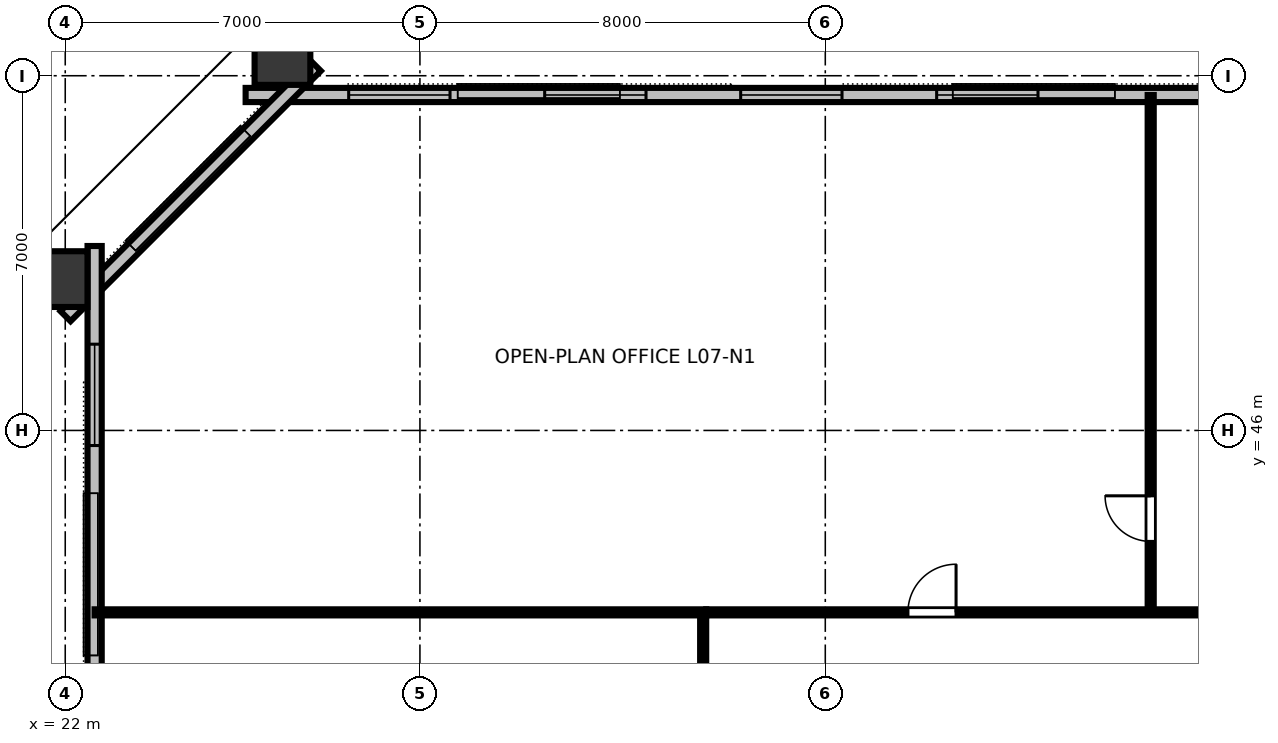
"""IFC4 building model, lengths in metres.
Left out: names, types, materials, properties, quantities, classifications, styles, units other than length and angle.
Written with IfcOpenShell. Run it as: python <this file> out.ifc"""

import sys

from ifc_helpers import new_model, si_unit, direction, frame, frame_2d, origin, origin_2d, place, context, subcontext, project, spatial, rectangle, hollow_rectangle, extrude, element, fill, save


model = new_model("IFC4")
c1 = context("Model", 3, precision=1e-05, world=origin(), true_north=direction((0.0, 1.0)))
c2 = subcontext(c1, "Body", "Model", "MODEL_VIEW")
j1 = project(units=[si_unit("LENGTHUNIT", "METRE"), si_unit("PLANEANGLEUNIT", "RADIAN")], contexts=[c1])
p1 = place(None, origin())
s1 = spatial("IfcSite", under=j1, at=p1, CompositionType="ELEMENT")
p2 = place(p1, origin())
s2 = spatial("IfcBuilding", under=s1, at=p2, CompositionType="ELEMENT")
p3 = place(p2, frame((0.0, 0.0, 31.6)))
s3 = spatial("IfcBuildingStorey", under=s2, at=p3, CompositionType="ELEMENT", Elevation=31.6)
for number, where, z_axis, x_axis in (
    (1, (26.287, 53.469, 0.0), (0.0, 0.0, 1.0), (1.0, 0.0, 0.0)),
    (2, (21.789, 48.987, 0.0), (0.0, 0.0, 1.0), (0.0, 1.0, 0.0)),
):
    element("IfcColumn", number, at=place(p3, frame(where, z_axis=z_axis, x_axis=x_axis)), inside=s3, PredefinedType="COLUMN", context=c2, shape_type="SweptSolid", body=[
        extrude(hollow_rectangle(XDim=1.1, YDim=1.3, WallThickness=0.07, at=origin_2d()), origin(), (0.0, 0.0, 1.0), 3.148),
    ])
p4 = place(p3, frame((66.44, 52.62, 0.0), z_axis=(0.0, 0.0, 1.0), x_axis=(-1.0, 0.0, 0.0)))
e3 = element("IfcWall", 3, at=p4, inside=s3, PredefinedType="STANDARD", context=c2, shape_type="SweptSolid", body=[
    extrude(rectangle(XDim=40.88, YDim=0.28, at=frame_2d((20.44, 0.0))), origin(), (0.0, 0.0, 1.0), 3.15),
])
p5 = place(p4, frame((2.034, 0.0, 0.8)))
e4 = element("IfcOpeningElement", 4, at=p5, cuts=e3, PredefinedType="OPENING", context=c2, shape_type="SweptSolid", body=[
    extrude(rectangle(XDim=2.0, YDim=1.95, at=frame_2d((1.0, 0.975))), frame((0.0, 0.15, 0.0), z_axis=(0.0, -1.0, 0.0), x_axis=(1.0, 0.0, 0.0)), (0.0, 0.0, 1.0), 0.3),
])
p6 = place(p4, frame((5.902, 0.0, 0.8)))
e5 = element("IfcOpeningElement", 5, at=p6, cuts=e3, PredefinedType="OPENING", context=c2, shape_type="SweptSolid", body=[
    extrude(rectangle(XDim=2.0, YDim=1.95, at=frame_2d((1.0, 0.975))), frame((0.0, 0.15, 0.0), z_axis=(0.0, -1.0, 0.0), x_axis=(1.0, 0.0, 0.0)), (0.0, 0.0, 1.0), 0.3),
])
p7 = place(p4, frame((9.77, 0.0, 0.8)))
e6 = element("IfcOpeningElement", 6, at=p7, cuts=e3, PredefinedType="OPENING", context=c2, shape_type="SweptSolid", body=[
    extrude(rectangle(XDim=2.0, YDim=1.95, at=frame_2d((1.0, 0.975))), frame((0.0, 0.15, 0.0), z_axis=(0.0, -1.0, 0.0), x_axis=(1.0, 0.0, 0.0)), (0.0, 0.0, 1.0), 0.3),
])
p8 = place(p4, frame((13.638, 0.0, 0.8)))
e7 = element("IfcOpeningElement", 7, at=p8, cuts=e3, PredefinedType="OPENING", context=c2, shape_type="SweptSolid", body=[
    extrude(rectangle(XDim=2.0, YDim=1.95, at=frame_2d((1.0, 0.975))), frame((0.0, 0.15, 0.0), z_axis=(0.0, -1.0, 0.0), x_axis=(1.0, 0.0, 0.0)), (0.0, 0.0, 1.0), 0.3),
])
p9 = place(p4, frame((25.242, 0.0, 0.8)))
e8 = element("IfcOpeningElement", 8, at=p9, cuts=e3, PredefinedType="OPENING", context=c2, shape_type="SweptSolid", body=[
    extrude(rectangle(XDim=2.0, YDim=1.95, at=frame_2d((1.0, 0.975))), frame((0.0, 0.15, 0.0), z_axis=(0.0, -1.0, 0.0), x_axis=(1.0, 0.0, 0.0)), (0.0, 0.0, 1.0), 0.3),
])
p10 = place(p4, frame((29.11, 0.0, 0.8)))
e9 = element("IfcOpeningElement", 9, at=p10, cuts=e3, PredefinedType="OPENING", context=c2, shape_type="SweptSolid", body=[
    extrude(rectangle(XDim=2.0, YDim=1.95, at=frame_2d((1.0, 0.975))), frame((0.0, 0.15, 0.0), z_axis=(0.0, -1.0, 0.0), x_axis=(1.0, 0.0, 0.0)), (0.0, 0.0, 1.0), 0.3),
])
p11 = place(p4, frame((32.978, 0.0, 0.8)))
e10 = element("IfcOpeningElement", 10, at=p11, cuts=e3, PredefinedType="OPENING", context=c2, shape_type="SweptSolid", body=[
    extrude(rectangle(XDim=2.0, YDim=1.95, at=frame_2d((1.0, 0.975))), frame((0.0, 0.15, 0.0), z_axis=(0.0, -1.0, 0.0), x_axis=(1.0, 0.0, 0.0)), (0.0, 0.0, 1.0), 0.3),
])
p12 = place(p4, frame((36.846, 0.0, 0.8)))
e11 = element("IfcOpeningElement", 11, at=p12, cuts=e3, PredefinedType="OPENING", context=c2, shape_type="SweptSolid", body=[
    extrude(rectangle(XDim=2.0, YDim=1.95, at=frame_2d((1.0, 0.975))), frame((0.0, 0.15, 0.0), z_axis=(0.0, -1.0, 0.0), x_axis=(1.0, 0.0, 0.0)), (0.0, 0.0, 1.0), 0.3),
])
p13 = place(p3, frame((26.946, 53.194, 0.0), z_axis=(0.0, 0.0, 1.0), x_axis=(-0.707106781187, -0.707106781187, 0.0)))
e12 = element("IfcWall", 12, at=p13, inside=s3, PredefinedType="STANDARD", context=c2, shape_type="SweptSolid", body=[
    extrude(rectangle(XDim=6.985, YDim=0.28, at=frame_2d((3.493, 0.0))), origin(), (0.0, 0.0, 1.0), 3.15),
])
p14 = place(p3, frame((22.58, 49.64, 0.0), z_axis=(0.0, 0.0, 1.0), x_axis=(0.0, -1.0, 0.0)))
e13 = element("IfcWall", 13, at=p14, inside=s3, PredefinedType="STANDARD", context=c2, shape_type="SweptSolid", body=[
    extrude(rectangle(XDim=35.28, YDim=0.28, at=frame_2d((17.64, 0.0))), origin(), (0.0, 0.0, 1.0), 3.15),
])
p15 = place(p14, frame((1.938, 0.0, 0.8)))
e14 = element("IfcOpeningElement", 14, at=p15, cuts=e13, PredefinedType="OPENING", context=c2, shape_type="SweptSolid", body=[
    extrude(rectangle(XDim=2.0, YDim=1.95, at=frame_2d((1.0, 0.975))), frame((0.0, 0.15, 0.0), z_axis=(0.0, -1.0, 0.0), x_axis=(1.0, 0.0, 0.0)), (0.0, 0.0, 1.0), 0.3),
])
p16 = place(p14, frame((9.289, 0.0, 0.8)))
e15 = element("IfcOpeningElement", 15, at=p16, cuts=e13, PredefinedType="OPENING", context=c2, shape_type="SweptSolid", body=[
    extrude(rectangle(XDim=2.0, YDim=1.95, at=frame_2d((1.0, 0.975))), frame((0.0, 0.15, 0.0), z_axis=(0.0, -1.0, 0.0), x_axis=(1.0, 0.0, 0.0)), (0.0, 0.0, 1.0), 0.3),
])
p17 = place(p14, frame((12.964, 0.0, 0.8)))
e16 = element("IfcOpeningElement", 16, at=p17, cuts=e13, PredefinedType="OPENING", context=c2, shape_type="SweptSolid", body=[
    extrude(rectangle(XDim=2.0, YDim=1.95, at=frame_2d((1.0, 0.975))), frame((0.0, 0.15, 0.0), z_axis=(0.0, -1.0, 0.0), x_axis=(1.0, 0.0, 0.0)), (0.0, 0.0, 1.0), 0.3),
])
p18 = place(p14, frame((23.991, 0.0, 0.8)))
e17 = element("IfcOpeningElement", 17, at=p18, cuts=e13, PredefinedType="OPENING", context=c2, shape_type="SweptSolid", body=[
    extrude(rectangle(XDim=2.0, YDim=1.95, at=frame_2d((1.0, 0.975))), frame((0.0, 0.15, 0.0), z_axis=(0.0, -1.0, 0.0), x_axis=(1.0, 0.0, 0.0)), (0.0, 0.0, 1.0), 0.3),
])
p19 = place(p14, frame((31.342, 0.0, 0.8)))
e18 = element("IfcOpeningElement", 18, at=p19, cuts=e13, PredefinedType="OPENING", context=c2, shape_type="SweptSolid", body=[
    extrude(rectangle(XDim=2.0, YDim=1.95, at=frame_2d((1.0, 0.975))), frame((0.0, 0.15, 0.0), z_axis=(0.0, -1.0, 0.0), x_axis=(1.0, 0.0, 0.0)), (0.0, 0.0, 1.0), 0.3),
])
p20 = place(p3, frame((43.422, 42.41, 0.0), z_axis=(0.0, 0.0, 1.0), x_axis=(0.0, 1.0, 0.0)))
e19 = element("IfcWall", 19, at=p20, inside=s3, PredefinedType="PARTITIONING", context=c2, shape_type="SweptSolid", body=[
    extrude(rectangle(XDim=10.21, YDim=0.12, at=frame_2d((5.105, 0.0))), origin(), (0.0, 0.0, 1.0), 2.43),
])
p21 = place(p20, frame((1.4, 0.0, 0.0)))
e20 = element("IfcOpeningElement", 20, at=p21, cuts=e19, PredefinedType="OPENING", context=c2, shape_type="SweptSolid", body=[
    extrude(rectangle(XDim=0.9, YDim=2.15, at=frame_2d((0.45, 1.075))), frame((0.0, 0.07, 0.0), z_axis=(0.0, -1.0, 0.0), x_axis=(1.0, 0.0, 0.0)), (0.0, 0.0, 1.0), 0.14),
])
p22 = place(p3, frame((34.65, 42.41, 0.0), z_axis=(0.0, 0.0, 1.0), x_axis=(1.0, 0.0, 0.0)))
e21 = element("IfcWall", 21, at=p22, inside=s3, PredefinedType="PARTITIONING", context=c2, shape_type="SweptSolid", body=[
    extrude(rectangle(XDim=22.7, YDim=0.12, at=frame_2d((11.35, 0.0))), origin(), (0.0, 0.0, 1.0), 2.43),
])
p23 = place(p22, frame((3.981, 0.0, 0.0)))
e22 = element("IfcOpeningElement", 22, at=p23, cuts=e21, PredefinedType="OPENING", context=c2, shape_type="SweptSolid", body=[
    extrude(rectangle(XDim=0.95, YDim=2.15, at=frame_2d((0.475, 1.075))), frame((0.0, 0.07, 0.0), z_axis=(0.0, -1.0, 0.0), x_axis=(1.0, 0.0, 0.0)), (0.0, 0.0, 1.0), 0.14),
])
p24 = place(p22, frame((10.508, 0.0, 0.0)))
e23 = element("IfcOpeningElement", 23, at=p24, cuts=e21, PredefinedType="OPENING", context=c2, shape_type="SweptSolid", body=[
    extrude(rectangle(XDim=0.95, YDim=2.15, at=frame_2d((0.475, 1.075))), frame((0.0, 0.07, 0.0), z_axis=(0.0, -1.0, 0.0), x_axis=(1.0, 0.0, 0.0)), (0.0, 0.0, 1.0), 0.14),
])
p25 = place(p22, frame((17.402, 0.0, 0.0)))
e24 = element("IfcOpeningElement", 24, at=p25, cuts=e21, PredefinedType="OPENING", context=c2, shape_type="SweptSolid", body=[
    extrude(rectangle(XDim=0.95, YDim=2.15, at=frame_2d((0.475, 1.075))), frame((0.0, 0.07, 0.0), z_axis=(0.0, -1.0, 0.0), x_axis=(1.0, 0.0, 0.0)), (0.0, 0.0, 1.0), 0.14),
])
p26 = place(p3, frame((34.59, 21.65, 0.0), z_axis=(0.0, 0.0, 1.0), x_axis=(0.0, 1.0, 0.0)))
e25 = element("IfcWall", 25, at=p26, inside=s3, PredefinedType="PARTITIONING", context=c2, shape_type="SweptSolid", body=[
    extrude(rectangle(XDim=20.7, YDim=0.12, at=frame_2d((10.35, 0.0))), origin(), (0.0, 0.0, 1.0), 2.43),
])
p27 = place(p26, frame((3.161, 0.0, 0.0)))
e26 = element("IfcOpeningElement", 26, at=p27, cuts=e25, PredefinedType="OPENING", context=c2, shape_type="SweptSolid", body=[
    extrude(rectangle(XDim=0.95, YDim=2.15, at=frame_2d((0.475, 1.075))), frame((0.0, 0.07, 0.0), z_axis=(0.0, -1.0, 0.0), x_axis=(1.0, 0.0, 0.0)), (0.0, 0.0, 1.0), 0.14),
])
p28 = place(p26, frame((13.311, 0.0, 0.0)))
e27 = element("IfcOpeningElement", 27, at=p28, cuts=e25, PredefinedType="OPENING", context=c2, shape_type="SweptSolid", body=[
    extrude(rectangle(XDim=0.95, YDim=2.15, at=frame_2d((0.475, 1.075))), frame((0.0, 0.07, 0.0), z_axis=(0.0, -1.0, 0.0), x_axis=(1.0, 0.0, 0.0)), (0.0, 0.0, 1.0), 0.14),
])
p29 = place(p3, frame((34.65, 42.41, 0.0), z_axis=(0.0, 0.0, 1.0), x_axis=(-1.0, 0.0, 0.0)))
e28 = element("IfcWall", 28, at=p29, inside=s3, PredefinedType="PARTITIONING", context=c2, shape_type="SweptSolid", body=[
    extrude(rectangle(XDim=12.07, YDim=0.12, at=frame_2d((6.035, 0.0))), origin(), (0.0, 0.0, 1.0), 2.43),
])
p30 = place(p9, origin())
e29 = element("IfcWindow", 29, at=p30, inside=s3, PartitioningType="SINGLE_PANEL", PredefinedType="WINDOW", context=c2, shape_type="SweptSolid", body=[
    extrude(rectangle(XDim=2.0, YDim=1.95, at=frame_2d((1.0, 0.975))), frame((0.0, 0.03, 0.0), z_axis=(0.0, -1.0, 0.0), x_axis=(1.0, 0.0, 0.0)), (0.0, 0.0, 1.0), 0.06),
])
fill(e8, e29)
p31 = place(p10, origin())
e30 = element("IfcWindow", 30, at=p31, inside=s3, PartitioningType="SINGLE_PANEL", PredefinedType="WINDOW", context=c2, shape_type="SweptSolid", body=[
    extrude(rectangle(XDim=2.0, YDim=1.95, at=frame_2d((1.0, 0.975))), frame((0.0, 0.03, 0.0), z_axis=(0.0, -1.0, 0.0), x_axis=(1.0, 0.0, 0.0)), (0.0, 0.0, 1.0), 0.06),
])
fill(e9, e30)
p32 = place(p11, origin())
e31 = element("IfcWindow", 31, at=p32, inside=s3, PartitioningType="SINGLE_PANEL", PredefinedType="WINDOW", context=c2, shape_type="SweptSolid", body=[
    extrude(rectangle(XDim=2.0, YDim=1.95, at=frame_2d((1.0, 0.975))), frame((0.0, 0.03, 0.0), z_axis=(0.0, -1.0, 0.0), x_axis=(1.0, 0.0, 0.0)), (0.0, 0.0, 1.0), 0.06),
])
fill(e10, e31)
p33 = place(p12, origin())
e32 = element("IfcWindow", 32, at=p33, inside=s3, PartitioningType="SINGLE_PANEL", PredefinedType="WINDOW", context=c2, shape_type="SweptSolid", body=[
    extrude(rectangle(XDim=2.0, YDim=1.95, at=frame_2d((1.0, 0.975))), frame((0.0, 0.03, 0.0), z_axis=(0.0, -1.0, 0.0), x_axis=(1.0, 0.0, 0.0)), (0.0, 0.0, 1.0), 0.06),
])
fill(e11, e32)
p34 = place(p15, origin())
e33 = element("IfcWindow", 33, at=p34, inside=s3, PartitioningType="SINGLE_PANEL", PredefinedType="WINDOW", context=c2, shape_type="SweptSolid", body=[
    extrude(rectangle(XDim=2.0, YDim=1.95, at=frame_2d((1.0, 0.975))), frame((0.0, 0.03, 0.0), z_axis=(0.0, -1.0, 0.0), x_axis=(1.0, 0.0, 0.0)), (0.0, 0.0, 1.0), 0.06),
])
fill(e14, e33)
p35 = place(p21, origin())
e34 = element("IfcDoor", 34, at=p35, inside=s3, OperationType="SINGLE_SWING_RIGHT", PredefinedType="DOOR", context=c2, shape_type="SweptSolid", body=[
    extrude(rectangle(XDim=0.9, YDim=2.15, at=frame_2d((0.45, 1.075))), frame((0.0, 0.025, 0.0), z_axis=(0.0, -1.0, 0.0), x_axis=(1.0, 0.0, 0.0)), (0.0, 0.0, 1.0), 0.05),
])
fill(e20, e34)
p36 = place(p23, origin())
e35 = element("IfcDoor", 35, at=p36, inside=s3, OperationType="SINGLE_SWING_RIGHT", PredefinedType="DOOR", context=c2, shape_type="SweptSolid", body=[
    extrude(rectangle(XDim=0.95, YDim=2.15, at=frame_2d((0.475, 1.075))), frame((0.0, 0.025, 0.0), z_axis=(0.0, -1.0, 0.0), x_axis=(1.0, 0.0, 0.0)), (0.0, 0.0, 1.0), 0.05),
])
fill(e22, e35)
save(model, sys.argv[1])
